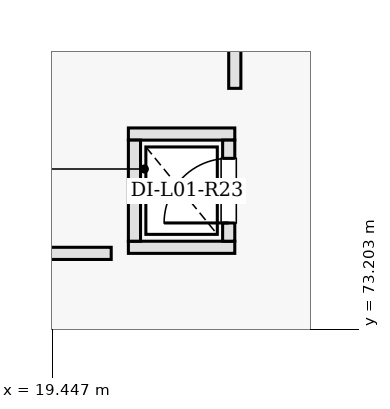
"""IFC4 building model, lengths in metres.
Left out: names, types, materials, properties, quantities, classifications, styles, units other than length and angle.
Written with IfcOpenShell. Run it as: python <this file> out.ifc"""

import sys

from ifc_helpers import new_model, si_unit, direction, frame, frame_2d, origin, place, context, subcontext, project, spatial, rectangle, extrude, element, fill, save


model = new_model("IFC4")
c1 = context("Model", 3, precision=1e-05, world=origin(), true_north=direction((0.0, 1.0)))
c2 = subcontext(c1, "Body", "Model", "MODEL_VIEW")
j1 = project(units=[si_unit("LENGTHUNIT", "METRE"), si_unit("PLANEANGLEUNIT", "RADIAN")], contexts=[c1])
p1 = place(None, origin())
s1 = spatial("IfcSite", under=j1, at=p1, CompositionType="ELEMENT")
p2 = place(p1, origin())
s2 = spatial("IfcBuilding", under=s1, at=p2, CompositionType="ELEMENT")
p3 = place(p2, frame((0.0, 0.0, 4.8)))
s3 = spatial("IfcBuildingStorey", under=s2, at=p3, CompositionType="ELEMENT", Elevation=4.8)
for number, where, z_axis, x_axis in (
    (1, (20.45, 74.28, 0.0), (0.0, 0.0, 1.0), (1.0, 0.0, 0.0)),
    (2, (20.45, 75.77, 0.0), (0.0, 0.0, 1.0), (1.0, 0.0, 0.0)),
):
    element("IfcWall", number, at=place(p3, frame(where, z_axis=z_axis, x_axis=x_axis)), inside=s3, PredefinedType="PARTITIONING", context=c2, shape_type="SweptSolid", body=[
        extrude(rectangle(XDim=1.4, YDim=0.16, at=frame_2d((0.7, 0.0))), origin(), (0.0, 0.0, 1.0), 4.48),
    ])
p4 = place(p3, frame((20.53, 74.36, 0.0), z_axis=(0.0, 0.0, 1.0), x_axis=(0.0, 1.0, 0.0)))
e3 = element("IfcWall", 3, at=p4, inside=s3, PredefinedType="PARTITIONING", context=c2, shape_type="SweptSolid", body=[
    extrude(rectangle(XDim=1.33, YDim=0.16, at=frame_2d((0.665, 0.0))), origin(), (0.0, 0.0, 1.0), 4.48),
])
p5 = place(p3, frame((21.77, 74.36, 0.0), z_axis=(0.0, 0.0, 1.0), x_axis=(0.0, 1.0, 0.0)))
e4 = element("IfcWall", 4, at=p5, inside=s3, PredefinedType="PARTITIONING", context=c2, shape_type="SweptSolid", body=[
    extrude(rectangle(XDim=1.33, YDim=0.16, at=frame_2d((0.665, 0.0))), origin(), (0.0, 0.0, 1.0), 4.48),
])
p6 = place(p5, frame((0.24, 0.0, 0.0)))
e5 = element("IfcOpeningElement", 5, at=p6, cuts=e4, PredefinedType="OPENING", context=c2, shape_type="SweptSolid", body=[
    extrude(rectangle(XDim=0.85, YDim=2.02, at=frame_2d((0.425, 1.01))), frame((0.0, 0.09, 0.0), z_axis=(0.0, -1.0, 0.0), x_axis=(1.0, 0.0, 0.0)), (0.0, 0.0, 1.0), 0.18),
])
p7 = place(p3, frame((17.37, 74.2, 0.0), z_axis=(0.0, 0.0, 1.0), x_axis=(1.0, 0.0, 0.0)))
e6 = element("IfcWall", 6, at=p7, inside=s3, PredefinedType="PARTITIONING", context=c2, shape_type="SweptSolid", body=[
    extrude(rectangle(XDim=2.854, YDim=0.16, at=frame_2d((1.427, 0.0))), origin(), (0.0, 0.0, 1.0), 4.48),
])
p8 = place(p3, frame((21.85, 76.371, 0.0), z_axis=(0.0, 0.0, 1.0), x_axis=(0.0, 1.0, 0.0)))
e7 = element("IfcWall", 7, at=p8, inside=s3, PredefinedType="PARTITIONING", context=c2, shape_type="SweptSolid", body=[
    extrude(rectangle(XDim=3.839, YDim=0.16, at=frame_2d((1.919, 0.0))), origin(), (0.0, 0.0, 1.0), 3.765),
])
p9 = place(p6, origin())
e8 = element("IfcDoor", 8, at=p9, inside=s3, OperationType="SINGLE_SWING_LEFT", PredefinedType="DOOR", context=c2, shape_type="SweptSolid", body=[
    extrude(rectangle(XDim=0.85, YDim=2.02, at=frame_2d((0.425, 1.01))), frame((0.0, 0.025, 0.0), z_axis=(0.0, -1.0, 0.0), x_axis=(1.0, 0.0, 0.0)), (0.0, 0.0, 1.0), 0.05),
])
fill(e5, e8)
save(model, sys.argv[1])
